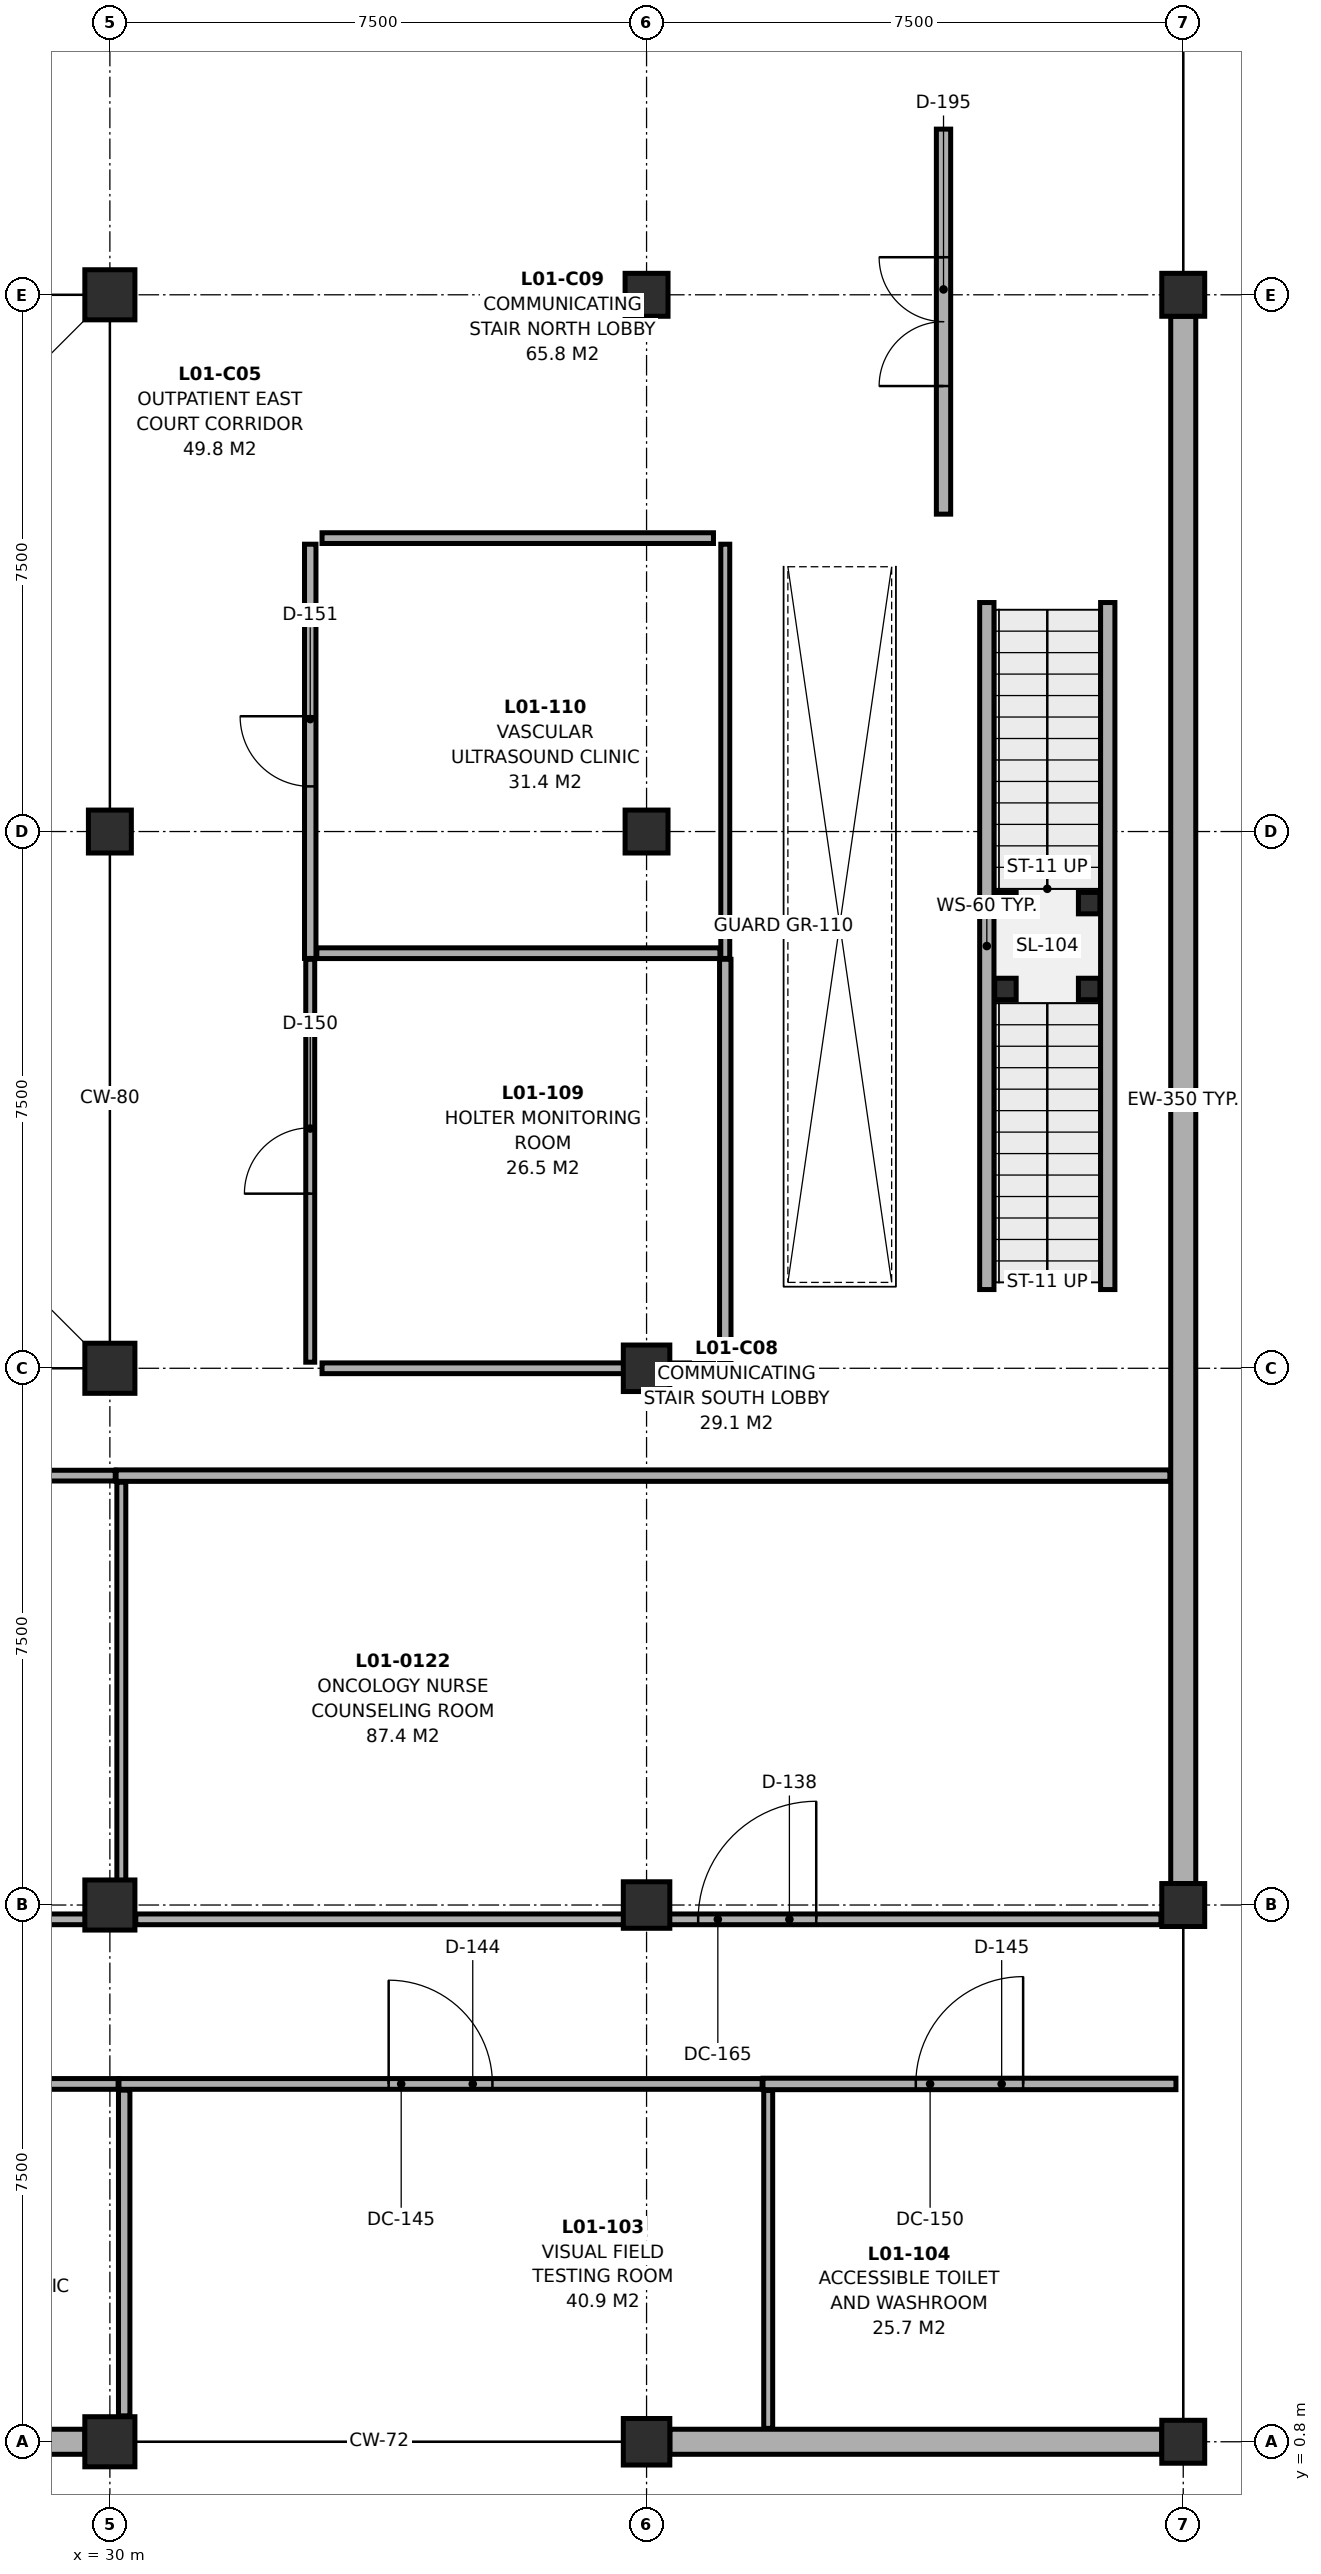
"""IFC4 building model, lengths in metres.
Left out: names, types, materials, properties, quantities, classifications, styles, units other than length and angle.
Written with IfcOpenShell. Run it as: python <this file> out.ifc"""

import sys

from ifc_helpers import new_model, si_unit, direction, frame, frame_2d, origin, origin_2d, place, context, subcontext, project, spatial, rectangle, i_section, extrude, element, fill, save


model = new_model("IFC4")
c1 = context("Model", 3, precision=1e-05, world=origin(), true_north=direction((0.0, 1.0)))
c2 = subcontext(c1, "Body", "Model", "MODEL_VIEW")
j1 = project(units=[si_unit("LENGTHUNIT", "METRE"), si_unit("PLANEANGLEUNIT", "RADIAN")], contexts=[c1])
p1 = place(None, origin())
s1 = spatial("IfcSite", under=j1, at=p1, CompositionType="ELEMENT")
p2 = place(p1, origin())
s2 = spatial("IfcBuilding", under=s1, at=p2, CompositionType="ELEMENT")
p3 = place(p2, frame((0.0, 0.0, 5.0)))
s3 = spatial("IfcBuildingStorey", under=s2, at=p3, CompositionType="ELEMENT", Elevation=5.0)
for number, where, z_axis, x_axis in (
    (1, (30.0, 0.8, 0.0), (0.0, 0.0, 1.0), (1.0, 0.0, 0.0)),
    (2, (30.0, 8.3, 0.0), (0.0, 0.0, 1.0), (1.0, 0.0, 0.0)),
    (3, (30.0, 15.8, 0.0), (0.0, 0.0, 1.0), (1.0, 0.0, 0.0)),
):
    element("IfcColumn", number, at=place(p3, frame(where, z_axis=z_axis, x_axis=x_axis)), inside=s3, PredefinedType="COLUMN", context=c2, shape_type="SweptSolid", body=[
        extrude(rectangle(XDim=0.7, YDim=0.7, at=origin_2d()), origin(), (0.0, 0.0, 1.0), 4.2),
    ])
p4 = place(p3, frame((30.0, 23.3, 0.0), z_axis=(0.0, 0.0, 1.0), x_axis=(1.0, 0.0, 0.0)))
e4 = element("IfcColumn", 4, at=p4, inside=s3, PredefinedType="COLUMN", context=c2, shape_type="SweptSolid", body=[
    extrude(rectangle(XDim=0.6, YDim=0.6, at=origin_2d()), origin(), (0.0, 0.0, 1.0), 4.2),
])
p5 = place(p3, frame((30.0, 30.8, 0.0), z_axis=(0.0, 0.0, 1.0), x_axis=(1.0, 0.0, 0.0)))
e5 = element("IfcColumn", 5, at=p5, inside=s3, PredefinedType="COLUMN", context=c2, shape_type="SweptSolid", body=[
    extrude(rectangle(XDim=0.7, YDim=0.7, at=origin_2d()), origin(), (0.0, 0.0, 1.0), 4.2),
])
for number, where, z_axis, x_axis in (
    (6, (37.5, 0.8, 0.0), (0.0, 0.0, 1.0), (1.0, 0.0, 0.0)),
    (7, (37.5, 8.3, 0.0), (0.0, 0.0, 1.0), (1.0, 0.0, 0.0)),
    (8, (37.5, 15.8, 0.0), (0.0, 0.0, 1.0), (1.0, 0.0, 0.0)),
):
    element("IfcColumn", number, at=place(p3, frame(where, z_axis=z_axis, x_axis=x_axis)), inside=s3, PredefinedType="COLUMN", context=c2, shape_type="SweptSolid", body=[
        extrude(rectangle(XDim=0.65, YDim=0.65, at=origin_2d()), origin(), (0.0, 0.0, 1.0), 4.2),
    ])
for number, where, z_axis, x_axis in (
    (9, (37.5, 23.3, 0.0), (0.0, 0.0, 1.0), (1.0, 0.0, 0.0)),
    (10, (37.5, 30.8, 0.0), (0.0, 0.0, 1.0), (1.0, 0.0, 0.0)),
    (11, (45.0, 0.8, 0.0), (0.0, 0.0, 1.0), (1.0, 0.0, 0.0)),
    (12, (45.0, 8.3, 0.0), (0.0, 0.0, 1.0), (1.0, 0.0, 0.0)),
    (13, (45.0, 30.8, 0.0), (0.0, 0.0, 1.0), (1.0, 0.0, 0.0)),
):
    element("IfcColumn", number, at=place(p3, frame(where, z_axis=z_axis, x_axis=x_axis)), inside=s3, PredefinedType="COLUMN", context=c2, shape_type="SweptSolid", body=[
        extrude(rectangle(XDim=0.6, YDim=0.6, at=origin_2d()), origin(), (0.0, 0.0, 1.0), 4.2),
    ])
p6 = place(p3, frame((45.0, 30.5, 0.0), z_axis=(0.0, 0.0, 1.0), x_axis=(0.0, -1.0, 0.0)))
e14 = element("IfcWall", 14, at=p6, inside=s3, PredefinedType="SOLIDWALL", context=c2, shape_type="SweptSolid", body=[
    extrude(rectangle(XDim=21.9, YDim=0.35, at=frame_2d((10.95, 0.0))), origin(), (0.0, 0.0, 1.0), 3.485),
])
p7 = place(p3, frame((44.7, 0.8, 0.0), z_axis=(0.0, 0.0, 1.0), x_axis=(-1.0, 0.0, 0.0)))
e15 = element("IfcWall", 15, at=p7, inside=s3, PredefinedType="SOLIDWALL", context=c2, shape_type="SweptSolid", body=[
    extrude(rectangle(XDim=6.875, YDim=0.35, at=frame_2d((3.438, 0.0))), origin(), (0.0, 0.0, 1.0), 3.485),
])
p8 = place(p3, frame((29.65, 0.8, 0.0), z_axis=(0.0, 0.0, 1.0), x_axis=(-1.0, 0.0, 0.0)))
e16 = element("IfcWall", 16, at=p8, inside=s3, PredefinedType="SOLIDWALL", context=c2, shape_type="SweptSolid", body=[
    extrude(rectangle(XDim=6.8, YDim=0.35, at=frame_2d((3.4, 0.0))), origin(), (0.0, 0.0, 1.0), 3.535),
])
for number, where, z_axis, x_axis in (
    (17, (42.255, 16.9, 0.0), (0.0, 0.0, 1.0), (0.0, 1.0, 0.0)),
    (18, (43.945, 16.9, 0.0), (0.0, 0.0, 1.0), (0.0, 1.0, 0.0)),
):
    element("IfcWall", number, at=place(p3, frame(where, z_axis=z_axis, x_axis=x_axis)), inside=s3, PredefinedType="PARTITIONING", context=c2, shape_type="SweptSolid", body=[
        extrude(rectangle(XDim=9.6, YDim=0.2, at=frame_2d((4.8, 0.0))), origin(), (0.0, 0.0, 1.0), 4.2),
    ])
for number, where, z_axis, x_axis in (
    (19, (42.515, 21.1, 0.0), (0.0, 0.0, 1.0), (1.0, 0.0, 0.0)),
    (20, (43.685, 21.1, 0.0), (0.0, 0.0, 1.0), (1.0, 0.0, 0.0)),
    (21, (43.685, 22.3, 0.0), (0.0, 0.0, 1.0), (1.0, 0.0, 0.0)),
    (22, (42.515, 22.3, 0.0), (0.0, 0.0, 1.0), (1.0, 0.0, 0.0)),
):
    element("IfcColumn", number, at=place(p3, frame(where, z_axis=z_axis, x_axis=x_axis)), inside=s3, PredefinedType="COLUMN", context=c2, shape_type="SweptSolid", body=[
        extrude(i_section(OverallWidth=0.3, OverallDepth=0.3, WebThickness=0.011, FlangeThickness=0.019, FilletRadius=0.027, at=origin_2d()), origin(), (0.0, 0.0, 1.0), 2.05),
    ])
p9 = place(p3, frame((22.727, 5.8, 0.0), z_axis=(0.0, 0.0, 1.0), x_axis=(1.0, 0.0, 0.0)))
e23 = element("IfcWall", 23, at=p9, inside=s3, PredefinedType="PARTITIONING", context=c2, shape_type="SweptSolid", body=[
    extrude(rectangle(XDim=7.388, YDim=0.15, at=frame_2d((3.694, 0.0))), origin(), (0.0, 0.0, 1.0), 3.265),
])
p10 = place(p9, frame((2.994, 0.0, 0.0)))
e24 = element("IfcOpeningElement", 24, at=p10, cuts=e23, PredefinedType="OPENING", context=c2, shape_type="SweptSolid", body=[
    extrude(rectangle(XDim=1.4, YDim=2.25, at=frame_2d((0.7, 1.125))), frame((0.0, 0.087, 0.0), z_axis=(0.0, -1.0, 0.0), x_axis=(1.0, 0.0, 0.0)), (0.0, 0.0, 1.0), 0.174),
])
p11 = place(p3, frame((30.127, 5.8, 0.0), z_axis=(0.0, 0.0, 1.0), x_axis=(1.0, 0.0, 0.0)))
e25 = element("IfcWall", 25, at=p11, inside=s3, PredefinedType="PARTITIONING", context=c2, shape_type="SweptSolid", body=[
    extrude(rectangle(XDim=8.988, YDim=0.15, at=frame_2d((4.494, 0.0))), origin(), (0.0, 0.0, 1.0), 3.485),
])
p12 = place(p11, frame((3.769, 0.0, 0.0)))
e26 = element("IfcOpeningElement", 26, at=p12, cuts=e25, PredefinedType="OPENING", context=c2, shape_type="SweptSolid", body=[
    extrude(rectangle(XDim=1.45, YDim=2.26, at=frame_2d((0.725, 1.13))), frame((0.0, 0.087, 0.0), z_axis=(0.0, -1.0, 0.0), x_axis=(1.0, 0.0, 0.0)), (0.0, 0.0, 1.0), 0.174),
])
p13 = place(p3, frame((39.127, 5.8, 0.0), z_axis=(0.0, 0.0, 1.0), x_axis=(1.0, 0.0, 0.0)))
e27 = element("IfcWall", 27, at=p13, inside=s3, PredefinedType="PARTITIONING", context=c2, shape_type="SweptSolid", body=[
    extrude(rectangle(XDim=5.771, YDim=0.16, at=frame_2d((2.885, 0.0))), origin(), (0.0, 0.0, 1.0), 3.535),
])
p14 = place(p13, frame((2.135, 0.0, 0.0)))
e28 = element("IfcOpeningElement", 28, at=p14, cuts=e27, PredefinedType="OPENING", context=c2, shape_type="SweptSolid", body=[
    extrude(rectangle(XDim=1.5, YDim=2.28, at=frame_2d((0.75, 1.14))), frame((0.0, 0.092, 0.0), z_axis=(0.0, -1.0, 0.0), x_axis=(1.0, 0.0, 0.0)), (0.0, 0.0, 1.0), 0.184),
])
p15 = place(p3, frame((15.362, 8.1, 0.0), z_axis=(0.0, 0.0, 1.0), x_axis=(1.0, 0.0, 0.0)))
e29 = element("IfcWall", 29, at=p15, inside=s3, PredefinedType="PARTITIONING", context=c2, shape_type="SweptSolid", body=[
    extrude(rectangle(XDim=14.546, YDim=0.15, at=frame_2d((7.273, 0.0))), origin(), (0.0, 0.0, 1.0), 3.265),
])
p16 = place(p15, frame((7.662, 0.0, 0.0)))
e30 = element("IfcOpeningElement", 30, at=p16, cuts=e29, PredefinedType="OPENING", context=c2, shape_type="SweptSolid", body=[
    extrude(rectangle(XDim=1.56, YDim=2.3, at=frame_2d((0.78, 1.15))), frame((0.0, 0.087, 0.0), z_axis=(0.0, -1.0, 0.0), x_axis=(1.0, 0.0, 0.0)), (0.0, 0.0, 1.0), 0.174),
])
p17 = place(p3, frame((30.362, 8.1, 0.0), z_axis=(0.0, 0.0, 1.0), x_axis=(1.0, 0.0, 0.0)))
e31 = element("IfcWall", 31, at=p17, inside=s3, PredefinedType="PARTITIONING", context=c2, shape_type="SweptSolid", body=[
    extrude(rectangle(XDim=14.326, YDim=0.15, at=frame_2d((7.163, 0.0))), origin(), (0.0, 0.0, 1.0), 3.485),
])
p18 = place(p17, frame((7.859, 0.0, 0.0)))
e32 = element("IfcOpeningElement", 32, at=p18, cuts=e31, PredefinedType="OPENING", context=c2, shape_type="SweptSolid", body=[
    extrude(rectangle(XDim=1.65, YDim=2.32, at=frame_2d((0.825, 1.16))), frame((0.0, 0.087, 0.0), z_axis=(0.0, -1.0, 0.0), x_axis=(1.0, 0.0, 0.0)), (0.0, 0.0, 1.0), 0.174),
])
p19 = place(p3, frame((41.65, 27.735, 0.0), z_axis=(0.0, 0.0, 1.0), x_axis=(0.0, 1.0, 0.0)))
e33 = element("IfcWall", 33, at=p19, inside=s3, PredefinedType="PARTITIONING", context=c2, shape_type="SweptSolid", body=[
    extrude(rectangle(XDim=5.38, YDim=0.2, at=frame_2d((2.69, 0.0))), origin(), (0.0, 0.0, 1.0), 3.485),
])
p20 = place(p19, frame((1.79, 0.0, 0.0)))
e34 = element("IfcOpeningElement", 34, at=p20, cuts=e33, PredefinedType="OPENING", context=c2, shape_type="SweptSolid", body=[
    extrude(rectangle(XDim=1.8, YDim=2.15, at=frame_2d((0.9, 1.075))), frame((0.0, 0.112, 0.0), z_axis=(0.0, -1.0, 0.0), x_axis=(1.0, 0.0, 0.0)), (0.0, 0.0, 1.0), 0.224),
])
p21 = place(p3, frame((32.8, 15.885, 0.0), z_axis=(0.0, 0.0, 1.0), x_axis=(0.0, 1.0, 0.0)))
e35 = element("IfcWall", 35, at=p21, inside=s3, PredefinedType="PARTITIONING", context=c2, shape_type="SweptSolid", body=[
    extrude(rectangle(XDim=5.63, YDim=0.125, at=frame_2d((2.815, 0.0))), origin(), (0.0, 0.0, 1.0), 3.485),
])
p22 = place(p21, frame((2.355, 0.0, 0.0)))
e36 = element("IfcOpeningElement", 36, at=p22, cuts=e35, PredefinedType="OPENING", context=c2, shape_type="SweptSolid", body=[
    extrude(rectangle(XDim=0.92, YDim=2.1, at=frame_2d((0.46, 1.05))), frame((0.0, 0.074, 0.0), z_axis=(0.0, -1.0, 0.0), x_axis=(1.0, 0.0, 0.0)), (0.0, 0.0, 1.0), 0.149),
])
p23 = place(p3, frame((32.8, 21.527, 0.0), z_axis=(0.0, 0.0, 1.0), x_axis=(0.0, 1.0, 0.0)))
e37 = element("IfcWall", 37, at=p23, inside=s3, PredefinedType="PARTITIONING", context=c2, shape_type="SweptSolid", body=[
    extrude(rectangle(XDim=5.788, YDim=0.16, at=frame_2d((2.894, 0.0))), origin(), (0.0, 0.0, 1.0), 3.485),
])
p24 = place(p23, frame((2.404, 0.0, 0.0)))
e38 = element("IfcOpeningElement", 38, at=p24, cuts=e37, PredefinedType="OPENING", context=c2, shape_type="SweptSolid", body=[
    extrude(rectangle(XDim=0.98, YDim=2.12, at=frame_2d((0.49, 1.06))), frame((0.0, 0.092, 0.0), z_axis=(0.0, -1.0, 0.0), x_axis=(1.0, 0.0, 0.0)), (0.0, 0.0, 1.0), 0.184),
])
p25 = place(p3, frame((15.485, 14.3, 0.0), z_axis=(0.0, 0.0, 1.0), x_axis=(1.0, 0.0, 0.0)))
e39 = element("IfcWall", 39, at=p25, inside=s3, PredefinedType="PARTITIONING", context=c2, shape_type="SweptSolid", body=[
    extrude(rectangle(XDim=14.59, YDim=0.15, at=frame_2d((7.295, 0.0))), origin(), (0.0, 0.0, 1.0), 3.265),
])
p26 = place(p3, frame((30.087, 14.3, 0.0), z_axis=(0.0, 0.0, 1.0), x_axis=(1.0, 0.0, 0.0)))
e40 = element("IfcWall", 40, at=p26, inside=s3, PredefinedType="PARTITIONING", context=c2, shape_type="SweptSolid", body=[
    extrude(rectangle(XDim=14.726, YDim=0.16, at=frame_2d((7.363, 0.0))), origin(), (0.0, 0.0, 1.0), 3.485),
])
p27 = place(p3, frame((38.6, 15.885, 0.0), z_axis=(0.0, 0.0, 1.0), x_axis=(0.0, 1.0, 0.0)))
e41 = element("IfcWall", 41, at=p27, inside=s3, PredefinedType="PARTITIONING", context=c2, shape_type="SweptSolid", body=[
    extrude(rectangle(XDim=5.63, YDim=0.16, at=frame_2d((2.815, 0.0))), origin(), (0.0, 0.0, 1.0), 4.2),
])
p28 = place(p3, frame((38.6, 21.527, 0.0), z_axis=(0.0, 0.0, 1.0), x_axis=(0.0, 1.0, 0.0)))
e42 = element("IfcWall", 42, at=p28, inside=s3, PredefinedType="PARTITIONING", context=c2, shape_type="SweptSolid", body=[
    extrude(rectangle(XDim=5.788, YDim=0.125, at=frame_2d((2.894, 0.0))), origin(), (0.0, 0.0, 1.0), 4.2),
])
p29 = place(p3, frame((30.2, 1.162, 0.0), z_axis=(0.0, 0.0, 1.0), x_axis=(0.0, 1.0, 0.0)))
e43 = element("IfcWall", 43, at=p29, inside=s3, PredefinedType="PARTITIONING", context=c2, shape_type="SweptSolid", body=[
    extrude(rectangle(XDim=4.551, YDim=0.16, at=frame_2d((2.275, 0.0))), origin(), (0.0, 0.0, 1.0), 3.485),
])
p30 = place(p3, frame((39.2, 0.987, 0.0), z_axis=(0.0, 0.0, 1.0), x_axis=(0.0, 1.0, 0.0)))
e44 = element("IfcWall", 44, at=p30, inside=s3, PredefinedType="PARTITIONING", context=c2, shape_type="SweptSolid", body=[
    extrude(rectangle(XDim=4.721, YDim=0.125, at=frame_2d((2.36, 0.0))), origin(), (0.0, 0.0, 1.0), 3.535),
])
p31 = place(p3, frame((30.16, 8.432, 0.0), z_axis=(0.0, 0.0, 1.0), x_axis=(0.0, 1.0, 0.0)))
e45 = element("IfcWall", 45, at=p31, inside=s3, PredefinedType="PARTITIONING", context=c2, shape_type="SweptSolid", body=[
    extrude(rectangle(XDim=5.776, YDim=0.125, at=frame_2d((2.888, 0.0))), origin(), (0.0, 0.0, 1.0), 3.485),
])
p32 = place(p3, frame((32.965, 15.8, 0.0), z_axis=(0.0, 0.0, 1.0), x_axis=(1.0, 0.0, 0.0)))
e46 = element("IfcWall", 46, at=p32, inside=s3, PredefinedType="PARTITIONING", context=c2, shape_type="SweptSolid", body=[
    extrude(rectangle(XDim=5.47, YDim=0.15, at=frame_2d((2.735, 0.0))), origin(), (0.0, 0.0, 1.0), 3.485),
])
p33 = place(p3, frame((32.892, 21.6, 0.0), z_axis=(0.0, 0.0, 1.0), x_axis=(1.0, 0.0, 0.0)))
e47 = element("IfcWall", 47, at=p33, inside=s3, PredefinedType="PARTITIONING", context=c2, shape_type="SweptSolid", body=[
    extrude(rectangle(XDim=5.633, YDim=0.15, at=frame_2d((2.817, 0.0))), origin(), (0.0, 0.0, 1.0), 3.485),
])
p34 = place(p3, frame((32.965, 27.4, 0.0), z_axis=(0.0, 0.0, 1.0), x_axis=(1.0, 0.0, 0.0)))
e48 = element("IfcWall", 48, at=p34, inside=s3, PredefinedType="PARTITIONING", context=c2, shape_type="SweptSolid", body=[
    extrude(rectangle(XDim=5.47, YDim=0.15, at=frame_2d((2.735, 0.0))), origin(), (0.0, 0.0, 1.0), 3.485),
])
p35 = place(p12, origin())
e49 = element("IfcDoor", 49, at=p35, inside=s3, OperationType="SINGLE_SWING_LEFT", PredefinedType="DOOR", context=c2, shape_type="SweptSolid", body=[
    extrude(rectangle(XDim=1.45, YDim=2.26, at=frame_2d((0.725, 1.13))), frame((0.0, 0.025, 0.0), z_axis=(0.0, -1.0, 0.0), x_axis=(1.0, 0.0, 0.0)), (0.0, 0.0, 1.0), 0.05),
])
fill(e26, e49)
p36 = place(p14, origin())
e50 = element("IfcDoor", 50, at=p36, inside=s3, OperationType="SINGLE_SWING_RIGHT", PredefinedType="DOOR", context=c2, shape_type="SweptSolid", body=[
    extrude(rectangle(XDim=1.5, YDim=2.28, at=frame_2d((0.75, 1.14))), frame((0.0, 0.025, 0.0), z_axis=(0.0, -1.0, 0.0), x_axis=(1.0, 0.0, 0.0)), (0.0, 0.0, 1.0), 0.05),
])
fill(e28, e50)
p37 = place(p18, origin())
e51 = element("IfcDoor", 51, at=p37, inside=s3, OperationType="SINGLE_SWING_RIGHT", PredefinedType="DOOR", context=c2, shape_type="SweptSolid", body=[
    extrude(rectangle(XDim=1.65, YDim=2.32, at=frame_2d((0.825, 1.16))), frame((0.0, 0.025, 0.0), z_axis=(0.0, -1.0, 0.0), x_axis=(1.0, 0.0, 0.0)), (0.0, 0.0, 1.0), 0.05),
])
fill(e32, e51)
p38 = place(p20, origin())
e52 = element("IfcDoor", 52, at=p38, inside=s3, OperationType="DOUBLE_DOOR_SINGLE_SWING", PredefinedType="DOOR", context=c2, shape_type="SweptSolid", body=[
    extrude(rectangle(XDim=1.8, YDim=2.15, at=frame_2d((0.9, 1.075))), frame((0.0, 0.025, 0.0), z_axis=(0.0, -1.0, 0.0), x_axis=(1.0, 0.0, 0.0)), (0.0, 0.0, 1.0), 0.05),
])
fill(e34, e52)
p39 = place(p22, origin())
e53 = element("IfcDoor", 53, at=p39, inside=s3, OperationType="SINGLE_SWING_LEFT", PredefinedType="DOOR", context=c2, shape_type="SweptSolid", body=[
    extrude(rectangle(XDim=0.92, YDim=2.1, at=frame_2d((0.46, 1.05))), frame((0.0, 0.025, 0.0), z_axis=(0.0, -1.0, 0.0), x_axis=(1.0, 0.0, 0.0)), (0.0, 0.0, 1.0), 0.05),
])
fill(e36, e53)
p40 = place(p24, origin())
e54 = element("IfcDoor", 54, at=p40, inside=s3, OperationType="SINGLE_SWING_RIGHT", PredefinedType="DOOR", context=c2, shape_type="SweptSolid", body=[
    extrude(rectangle(XDim=0.98, YDim=2.12, at=frame_2d((0.49, 1.06))), frame((0.0, 0.025, 0.0), z_axis=(0.0, -1.0, 0.0), x_axis=(1.0, 0.0, 0.0)), (0.0, 0.0, 1.0), 0.05),
])
fill(e38, e54)
save(model, sys.argv[1])
